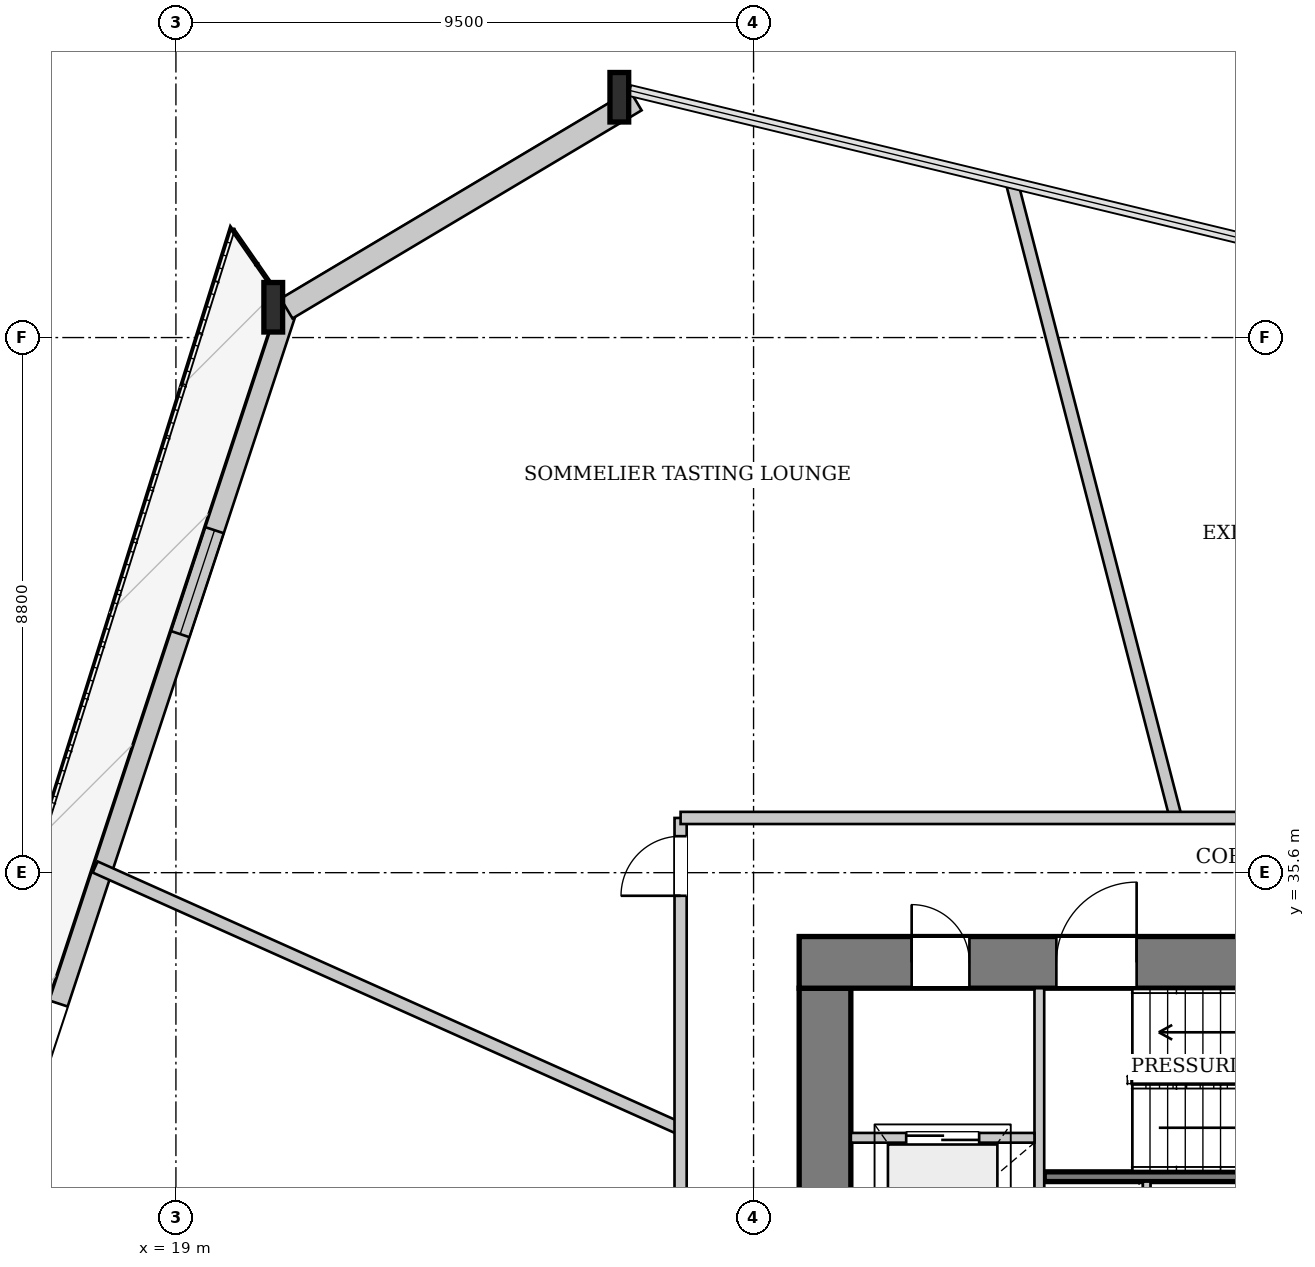
"""IFC4 building model, lengths in metres.
Left out: names, types, materials, properties, quantities, classifications, styles, units other than length and angle.
Written with IfcOpenShell. Run it as: python <this file> out.ifc"""

import sys

from ifc_helpers import new_model, si_unit, direction, frame, frame_2d, origin, origin_2d, place, context, subcontext, project, spatial, rectangle, i_section, extrude, source, transform, mapped, element, fill, save


model = new_model("IFC4")
c1 = context("Model", 3, precision=1e-05, world=origin(), true_north=direction((0.0, 1.0)))
c2 = subcontext(c1, "Body", "Model", "MODEL_VIEW")
j1 = project(units=[si_unit("LENGTHUNIT", "METRE"), si_unit("PLANEANGLEUNIT", "RADIAN")], contexts=[c1])
p1 = place(None, origin())
s1 = spatial("IfcSite", under=j1, at=p1, CompositionType="ELEMENT")
p2 = place(p1, origin())
s2 = spatial("IfcBuilding", under=s1, at=p2, CompositionType="ELEMENT")
p3 = place(p2, frame((0.0, 0.0, 29.3)))
s3 = spatial("IfcBuildingStorey", under=s2, at=p3, CompositionType="ELEMENT", Elevation=29.3)
m1 = source(origin(), c2, "Body", "SweptSolid", [
    extrude(i_section(OverallWidth=0.308, OverallDepth=0.814, WebThickness=0.021, FlangeThickness=0.04, at=origin_2d()), origin(), (0.0, 0.0, 1.0), 3.41),
])
p4 = place(p3, frame((26.464, 48.463, 0.0), z_axis=(-0.100816362927, -0.065158302744, 0.992769085211), x_axis=(0.542806016469, -0.839858100208, 0.0)))
e1 = element("IfcColumn", 1, at=p4, inside=s3, PredefinedType="COLUMN", context=c2, shape_type="MappedRepresentation", body=[
    mapped(m1, transform((0.0, 0.0, 0.0), x_axis=(1.0, 0.0, 0.0), y_axis=(0.0, 1.0, 0.0), z_axis=(0.0, 0.0, 1.0), scale=1.0)),
])
m2 = source(origin(), c2, "Body", "SweptSolid", [
    extrude(i_section(OverallWidth=0.308, OverallDepth=0.814, WebThickness=0.021, FlangeThickness=0.04, at=origin_2d()), origin(), (0.0, 0.0, 1.0), 3.406),
])
p5 = place(p3, frame((20.723, 45.04, 0.0), z_axis=(-0.07168631532, -0.083442871032, 0.993930761909), x_axis=(0.758520136118, -0.651649601476, 0.0)))
e2 = element("IfcColumn", 2, at=p5, inside=s3, PredefinedType="COLUMN", context=c2, shape_type="MappedRepresentation", body=[
    mapped(m2, transform((0.0, 0.0, 0.0), x_axis=(1.0, 0.0, 0.0), y_axis=(0.0, 1.0, 0.0), z_axis=(0.0, 0.0, 1.0), scale=1.0)),
])
p6 = place(p3, frame((15.023, 27.25, 0.0), z_axis=(0.0, 0.0, 1.0), x_axis=(0.313250403321, 0.94967056647, 0.0)))
e3 = element("IfcWall", 3, at=p6, inside=s3, PredefinedType="SOLIDWALL", context=c2, shape_type="SweptSolid", body=[
    extrude(rectangle(XDim=18.681, YDim=0.32, at=frame_2d((9.34, 0.0))), origin(), (0.0, 0.0, 1.0), 2.592),
])
p7 = place(p6, frame((5.428, 0.0, 0.0)))
e4 = element("IfcOpeningElement", 4, at=p7, cuts=e3, PredefinedType="OPENING", context=c2, shape_type="SweptSolid", body=[
    extrude(rectangle(XDim=1.1, YDim=2.3, at=frame_2d((0.55, 1.15))), frame((0.0, 0.17, 0.0), z_axis=(0.0, -1.0, 0.0), x_axis=(1.0, 0.0, 0.0)), (0.0, 0.0, 1.0), 0.34),
])
p8 = place(p6, frame((12.924, 0.0, 0.272)))
e5 = element("IfcOpeningElement", 5, at=p8, cuts=e3, PredefinedType="OPENING", context=c2, shape_type="SweptSolid", body=[
    extrude(rectangle(XDim=1.8, YDim=2.2, at=frame_2d((0.9, 1.1))), frame((0.0, 0.17, 0.0), z_axis=(0.0, -1.0, 0.0), x_axis=(1.0, 0.0, 0.0)), (0.0, 0.0, 1.0), 0.34),
])
p9 = place(p3, frame((20.82, 44.877, 0.0), z_axis=(0.0, 0.0, 1.0), x_axis=(0.858942957999, 0.512071279124, 0.0)))
e6 = element("IfcWall", 6, at=p9, inside=s3, PredefinedType="SOLIDWALL", context=c2, shape_type="SweptSolid", body=[
    extrude(rectangle(XDim=6.684, YDim=0.38, at=frame_2d((3.342, 0.0))), origin(), (0.0, 0.0, 1.0), 2.592),
])
p10 = place(p3, frame((29.675, 19.5, 0.0), z_axis=(0.0, 0.0, 1.0), x_axis=(0.0, 1.0, 0.0)))
e7 = element("IfcWall", 7, at=p10, inside=s3, PredefinedType="SHEAR", context=c2, shape_type="SweptSolid", body=[
    extrude(rectangle(XDim=14.2, YDim=0.85, at=frame_2d((7.1, 0.0))), origin(), (0.0, 0.0, 1.0), 3.3),
])
p11 = place(p10, frame((7.42, 0.0, 0.0)))
e8 = element("IfcOpeningElement", 8, at=p11, cuts=e7, PredefinedType="OPENING", context=c2, shape_type="SweptSolid", body=[
    extrude(rectangle(XDim=1.6, YDim=2.2, at=frame_2d((0.8, 1.1))), frame((0.0, 0.435, 0.0), z_axis=(0.0, -1.0, 0.0), x_axis=(1.0, 0.0, 0.0)), (0.0, 0.0, 1.0), 0.87),
])
p12 = place(p3, frame((29.25, 34.125, 0.0), z_axis=(0.0, 0.0, 1.0), x_axis=(1.0, 0.0, 0.0)))
e9 = element("IfcWall", 9, at=p12, inside=s3, PredefinedType="SHEAR", context=c2, shape_type="SweptSolid", body=[
    extrude(rectangle(XDim=17.5, YDim=0.85, at=frame_2d((8.75, 0.0))), origin(), (0.0, 0.0, 1.0), 3.3),
])
p13 = place(p12, frame((1.85, 0.0, 0.0)))
e10 = element("IfcOpeningElement", 10, at=p13, cuts=e9, PredefinedType="OPENING", context=c2, shape_type="SweptSolid", body=[
    extrude(rectangle(XDim=0.95, YDim=2.1, at=frame_2d((0.475, 1.05))), frame((0.0, 0.435, 0.0), z_axis=(0.0, -1.0, 0.0), x_axis=(1.0, 0.0, 0.0)), (0.0, 0.0, 1.0), 0.87),
])
p14 = place(p12, frame((4.23, 0.0, 0.0)))
e11 = element("IfcOpeningElement", 11, at=p14, cuts=e9, PredefinedType="OPENING", context=c2, shape_type="SweptSolid", body=[
    extrude(rectangle(XDim=1.32, YDim=2.2, at=frame_2d((0.66, 1.1))), frame((0.0, 0.435, 0.0), z_axis=(0.0, -1.0, 0.0), x_axis=(1.0, 0.0, 0.0)), (0.0, 0.0, 1.0), 0.87),
])
p15 = place(p12, frame((15.3, 0.0, 0.0)))
e12 = element("IfcOpeningElement", 12, at=p15, cuts=e9, PredefinedType="OPENING", context=c2, shape_type="SweptSolid", body=[
    extrude(rectangle(XDim=0.95, YDim=2.1, at=frame_2d((0.475, 1.05))), frame((0.0, 0.435, 0.0), z_axis=(0.0, -1.0, 0.0), x_axis=(1.0, 0.0, 0.0)), (0.0, 0.0, 1.0), 0.87),
])
p16 = place(p3, frame((33.28, 30.6, 0.0), z_axis=(0.0, 0.0, 1.0), x_axis=(1.0, 0.0, 0.0)))
e13 = element("IfcWall", 13, at=p16, inside=s3, PredefinedType="PARTITIONING", context=c2, shape_type="SweptSolid", body=[
    extrude(rectangle(XDim=7.3, YDim=0.16, at=frame_2d((3.65, 0.0))), origin(), (0.0, 0.0, 1.0), 3.3),
])
p17 = place(p3, frame((33.2, 28.44, 0.0), z_axis=(0.0, 0.0, 1.0), x_axis=(0.0, 1.0, 0.0)))
e14 = element("IfcWall", 14, at=p17, inside=s3, PredefinedType="PARTITIONING", context=c2, shape_type="SweptSolid", body=[
    extrude(rectangle(XDim=5.26, YDim=0.16, at=frame_2d((2.63, 0.0))), origin(), (0.0, 0.0, 1.0), 3.3),
])
p18 = place(p3, frame((30.1, 31.24, 0.0), z_axis=(0.0, 0.0, 1.0), x_axis=(1.0, 0.0, 0.0)))
e15 = element("IfcWall", 15, at=p18, inside=s3, PredefinedType="PARTITIONING", context=c2, shape_type="SweptSolid", body=[
    extrude(rectangle(XDim=3.02, YDim=0.16, at=frame_2d((1.51, 0.0))), origin(), (0.0, 0.0, 1.0), 3.3),
])
p19 = place(p18, frame((0.91, 0.0, 0.0)))
e16 = element("IfcOpeningElement", 16, at=p19, cuts=e15, PredefinedType="OPENING", context=c2, shape_type="SweptSolid", body=[
    extrude(rectangle(XDim=1.2, YDim=2.2, at=frame_2d((0.6, 1.1))), frame((0.0, 0.09, 0.0), z_axis=(0.0, -1.0, 0.0), x_axis=(1.0, 0.0, 0.0)), (0.0, 0.0, 1.0), 0.18),
])
p20 = place(p3, frame((34.965, 28.6, 0.0), z_axis=(0.0, 0.0, 1.0), x_axis=(0.0, 1.0, 0.0)))
e17 = element("IfcWall", 17, at=p20, inside=s3, PredefinedType="PARTITIONING", context=c2, shape_type="SweptSolid", body=[
    extrude(rectangle(XDim=1.92, YDim=0.125, at=frame_2d((0.96, 0.0))), origin(), (0.0, 0.0, 1.0), 3.3),
])
p21 = place(p3, frame((35.445, 36.5, 0.0), z_axis=(0.0, 0.0, 1.0), x_axis=(-0.249907551093, 0.968269702049, 0.0)))
e18 = element("IfcWall", 18, at=p21, inside=s3, PredefinedType="PARTITIONING", context=c2, shape_type="SweptSolid", body=[
    extrude(rectangle(XDim=10.751, YDim=0.2, at=frame_2d((5.375, 0.0))), origin(), (0.0, 0.0, 1.0), 3.3),
])
p22 = place(p3, frame((27.3, 31.386, 0.0), z_axis=(0.0, 0.0, 1.0), x_axis=(-0.912828695445, 0.408342714851, 0.0)))
e19 = element("IfcWall", 19, at=p22, inside=s3, PredefinedType="PARTITIONING", context=c2, shape_type="SweptSolid", body=[
    extrude(rectangle(XDim=10.548, YDim=0.2, at=frame_2d((5.274, 0.0))), origin(), (0.0, 0.0, 1.0), 3.3),
])
p23 = place(p3, frame((27.3, 16.7, 0.0), z_axis=(0.0, 0.0, 1.0), x_axis=(0.0, 1.0, 0.0)))
e20 = element("IfcWall", 20, at=p23, inside=s3, PredefinedType="PARTITIONING", context=c2, shape_type="SweptSolid", body=[
    extrude(rectangle(XDim=19.8, YDim=0.2, at=frame_2d((9.9, 0.0))), origin(), (0.0, 0.0, 1.0), 3.3),
])
p24 = place(p23, frame((18.52, 0.0, 0.0)))
e21 = element("IfcOpeningElement", 21, at=p24, cuts=e20, PredefinedType="OPENING", context=c2, shape_type="SweptSolid", body=[
    extrude(rectangle(XDim=0.98, YDim=2.15, at=frame_2d((0.49, 1.075))), frame((0.0, 0.11, 0.0), z_axis=(0.0, -1.0, 0.0), x_axis=(1.0, 0.0, 0.0)), (0.0, 0.0, 1.0), 0.22),
])
p25 = place(p23, frame((6.96, 0.0, 0.0)))
e22 = element("IfcOpeningElement", 22, at=p25, cuts=e20, PredefinedType="OPENING", context=c2, shape_type="SweptSolid", body=[
    extrude(rectangle(XDim=0.98, YDim=2.15, at=frame_2d((0.49, 1.075))), frame((0.0, 0.11, 0.0), z_axis=(0.0, -1.0, 0.0), x_axis=(1.0, 0.0, 0.0)), (0.0, 0.0, 1.0), 0.22),
])
p26 = place(p3, frame((27.3, 36.5, 0.0), z_axis=(0.0, 0.0, 1.0), x_axis=(1.0, 0.0, 0.0)))
e23 = element("IfcWall", 23, at=p26, inside=s3, PredefinedType="PARTITIONING", context=c2, shape_type="SweptSolid", body=[
    extrude(rectangle(XDim=21.4, YDim=0.2, at=frame_2d((10.7, 0.0))), origin(), (0.0, 0.0, 1.0), 3.3),
])
p27 = place(p26, frame((20.12, 0.0, 0.0)))
e24 = element("IfcOpeningElement", 24, at=p27, cuts=e23, PredefinedType="OPENING", context=c2, shape_type="SweptSolid", body=[
    extrude(rectangle(XDim=0.98, YDim=2.15, at=frame_2d((0.49, 1.075))), frame((0.0, 0.11, 0.0), z_axis=(0.0, -1.0, 0.0), x_axis=(1.0, 0.0, 0.0)), (0.0, 0.0, 1.0), 0.22),
])
p28 = place(p26, frame((13.395, 0.0, 0.0)))
e25 = element("IfcOpeningElement", 25, at=p28, cuts=e23, PredefinedType="OPENING", context=c2, shape_type="SweptSolid", body=[
    extrude(rectangle(XDim=0.98, YDim=2.15, at=frame_2d((0.49, 1.075))), frame((0.0, 0.11, 0.0), z_axis=(0.0, -1.0, 0.0), x_axis=(1.0, 0.0, 0.0)), (0.0, 0.0, 1.0), 0.22),
])
m3 = source(origin(), c2, "Body", "SweptSolid", [
    extrude(rectangle(XDim=1.1, YDim=2.3, at=frame_2d((0.55, 1.15))), frame((0.0, 0.025, 0.0), z_axis=(0.0, -1.0, 0.0), x_axis=(1.0, 0.0, 0.0)), (0.0, 0.0, 1.0), 0.05),
])
p29 = place(p7, origin())
e26 = element("IfcDoor", 26, at=p29, inside=s3, OperationType="SINGLE_SWING_LEFT", PredefinedType="DOOR", context=c2, shape_type="MappedRepresentation", body=[
    mapped(m3, transform((0.0, 0.0, 0.0), x_axis=(1.0, 0.0, 0.0), y_axis=(0.0, 1.0, 0.0), z_axis=(0.0, 0.0, 1.0), scale=1.0)),
])
fill(e4, e26)
m4 = source(origin(), c2, "Body", "SweptSolid", [
    extrude(rectangle(XDim=1.8, YDim=2.2, at=frame_2d((0.9, 1.1))), frame((0.0, 0.03, 0.0), z_axis=(0.0, -1.0, 0.0), x_axis=(1.0, 0.0, 0.0)), (0.0, 0.0, 1.0), 0.06),
])
p30 = place(p8, origin())
e27 = element("IfcWindow", 27, at=p30, inside=s3, PartitioningType="SINGLE_PANEL", PredefinedType="WINDOW", context=c2, shape_type="MappedRepresentation", body=[
    mapped(m4, transform((0.0, 0.0, 0.0), x_axis=(1.0, 0.0, 0.0), y_axis=(0.0, 1.0, 0.0), z_axis=(0.0, 0.0, 1.0), scale=1.0)),
])
fill(e5, e27)
m5 = source(origin(), c2, "Body", "SweptSolid", [
    extrude(rectangle(XDim=0.95, YDim=2.1, at=frame_2d((0.475, 1.05))), frame((0.0, 0.025, 0.0), z_axis=(0.0, -1.0, 0.0), x_axis=(1.0, 0.0, 0.0)), (0.0, 0.0, 1.0), 0.05),
])
p31 = place(p13, origin())
e28 = element("IfcDoor", 28, at=p31, inside=s3, OperationType="SINGLE_SWING_LEFT", PredefinedType="DOOR", context=c2, shape_type="MappedRepresentation", body=[
    mapped(m5, transform((0.0, 0.0, 0.0), x_axis=(1.0, 0.0, 0.0), y_axis=(0.0, 1.0, 0.0), z_axis=(0.0, 0.0, 1.0), scale=1.0)),
])
fill(e10, e28)
m6 = source(origin(), c2, "Body", "SweptSolid", [
    extrude(rectangle(XDim=1.32, YDim=2.2, at=frame_2d((0.66, 1.1))), frame((0.0, 0.025, 0.0), z_axis=(0.0, -1.0, 0.0), x_axis=(1.0, 0.0, 0.0)), (0.0, 0.0, 1.0), 0.05),
])
p32 = place(p14, origin())
e29 = element("IfcDoor", 29, at=p32, inside=s3, OperationType="SINGLE_SWING_RIGHT", PredefinedType="DOOR", context=c2, shape_type="MappedRepresentation", body=[
    mapped(m6, transform((0.0, 0.0, 0.0), x_axis=(1.0, 0.0, 0.0), y_axis=(0.0, 1.0, 0.0), z_axis=(0.0, 0.0, 1.0), scale=1.0)),
])
fill(e11, e29)
m7 = source(origin(), c2, "Body", "SweptSolid", [
    extrude(rectangle(XDim=1.2, YDim=2.2, at=frame_2d((0.6, 1.1))), frame((0.0, 0.025, 0.0), z_axis=(0.0, -1.0, 0.0), x_axis=(1.0, 0.0, 0.0)), (0.0, 0.0, 1.0), 0.05),
])
p33 = place(p19, origin())
e30 = element("IfcDoor", 30, at=p33, inside=s3, OperationType="DOUBLE_DOOR_SLIDING", PredefinedType="DOOR", context=c2, shape_type="MappedRepresentation", body=[
    mapped(m7, transform((0.0, 0.0, 0.0), x_axis=(1.0, 0.0, 0.0), y_axis=(0.0, 1.0, 0.0), z_axis=(0.0, 0.0, 1.0), scale=1.0)),
])
fill(e16, e30)
m8 = source(origin(), c2, "Body", "SweptSolid", [
    extrude(rectangle(XDim=0.98, YDim=2.15, at=frame_2d((0.49, 1.075))), frame((0.0, 0.025, 0.0), z_axis=(0.0, -1.0, 0.0), x_axis=(1.0, 0.0, 0.0)), (0.0, 0.0, 1.0), 0.05),
])
p34 = place(p24, origin())
e31 = element("IfcDoor", 31, at=p34, inside=s3, OperationType="SINGLE_SWING_LEFT", PredefinedType="DOOR", context=c2, shape_type="MappedRepresentation", body=[
    mapped(m8, transform((0.0, 0.0, 0.0), x_axis=(1.0, 0.0, 0.0), y_axis=(0.0, 1.0, 0.0), z_axis=(0.0, 0.0, 1.0), scale=1.0)),
])
fill(e21, e31)
save(model, sys.argv[1])
